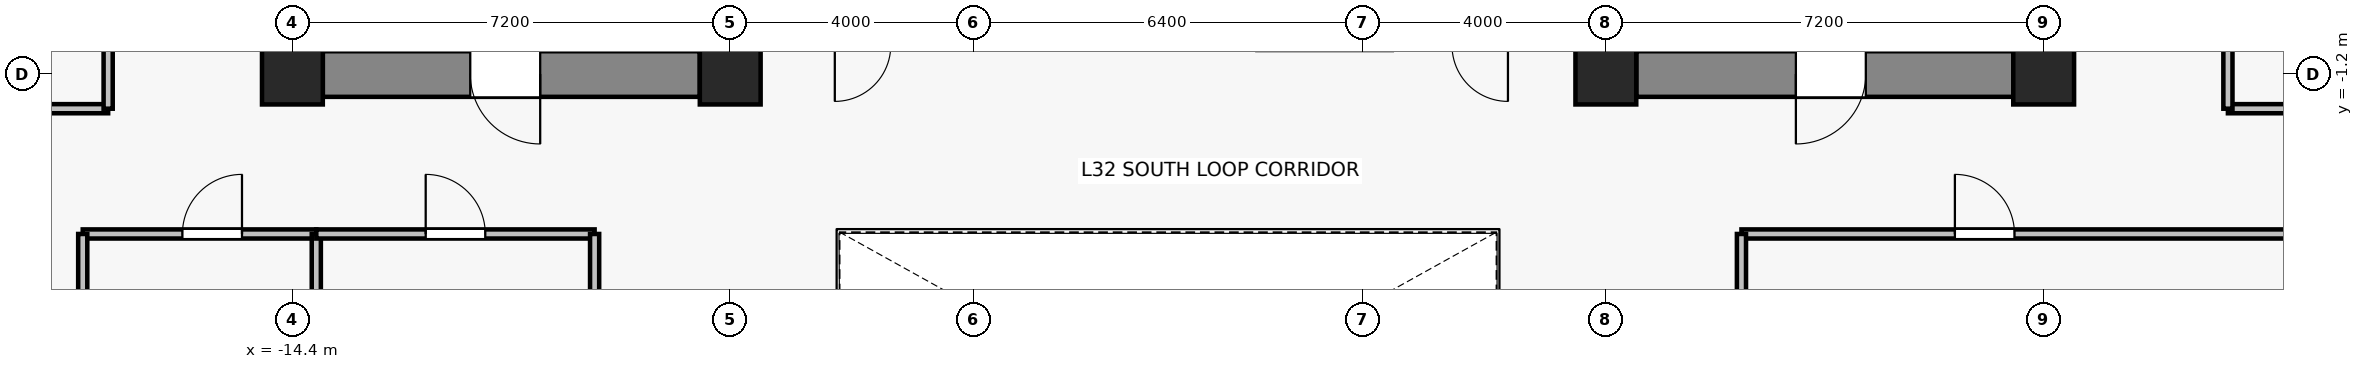
"""IFC4 building model, lengths in metres.
Left out: names, types, materials, properties, quantities, classifications, styles, units other than length and angle.
Written with IfcOpenShell. Run it as: python <this file> out.ifc"""

import sys

from ifc_helpers import new_model, si_unit, direction, frame, frame_2d, origin, origin_2d, place, context, subcontext, project, spatial, rectangle, extrude, source, transform, mapped, element, fill, save


model = new_model("IFC4")
c1 = context("Model", 3, precision=1e-05, world=origin(), true_north=direction((0.0, 1.0)))
c2 = subcontext(c1, "Body", "Model", "MODEL_VIEW")
j1 = project(units=[si_unit("LENGTHUNIT", "METRE"), si_unit("PLANEANGLEUNIT", "RADIAN")], contexts=[c1])
p1 = place(None, origin())
s1 = spatial("IfcSite", under=j1, at=p1, CompositionType="ELEMENT")
p2 = place(p1, origin())
s2 = spatial("IfcBuilding", under=s1, at=p2, CompositionType="ELEMENT")
p3 = place(p2, frame((0.0, 0.0, 116.5)))
s3 = spatial("IfcBuildingStorey", under=s2, at=p3, CompositionType="ELEMENT", Elevation=116.5)
for number, where, z_axis, x_axis in (
    (1, (-14.4, -1.2, 0.0), (0.0, 0.0, 1.0), (1.0, 0.0, 0.0)),
    (2, (-7.2, -1.2, 0.0), (0.0, 0.0, 1.0), (1.0, 0.0, 0.0)),
    (3, (7.2, -1.2, 0.0), (0.0, 0.0, 1.0), (1.0, 0.0, 0.0)),
    (4, (14.4, -1.2, 0.0), (0.0, 0.0, 1.0), (1.0, 0.0, 0.0)),
):
    element("IfcColumn", number, at=place(p3, frame(where, z_axis=z_axis, x_axis=x_axis)), inside=s3, PredefinedType="COLUMN", context=c2, shape_type="SweptSolid", body=[
        extrude(rectangle(XDim=1.0, YDim=1.0, at=origin_2d()), origin(), (0.0, 0.0, 1.0), 3.3),
    ])
p4 = place(p3, frame((-7.7, -1.2, 0.0), z_axis=(0.0, 0.0, 1.0), x_axis=(-1.0, 0.0, 0.0)))
e5 = element("IfcWall", 5, at=p4, inside=s3, PredefinedType="SHEAR", context=c2, shape_type="SweptSolid", body=[
    extrude(rectangle(XDim=6.2, YDim=0.75, at=frame_2d((3.1, 0.0))), origin(), (0.0, 0.0, 1.0), 3.075),
])
p5 = place(p4, frame((2.625, 0.0, 0.0)))
e6 = element("IfcOpeningElement", 6, at=p5, cuts=e5, PredefinedType="OPENING", context=c2, shape_type="SweptSolid", body=[
    extrude(rectangle(XDim=1.15, YDim=2.15, at=frame_2d((0.575, 1.075))), frame((0.0, 0.385, 0.0), z_axis=(0.0, -1.0, 0.0), x_axis=(1.0, 0.0, 0.0)), (0.0, 0.0, 1.0), 0.77),
])
p6 = place(p3, frame((13.9, -1.2, 0.0), z_axis=(0.0, 0.0, 1.0), x_axis=(-1.0, 0.0, 0.0)))
e7 = element("IfcWall", 7, at=p6, inside=s3, PredefinedType="SHEAR", context=c2, shape_type="SweptSolid", body=[
    extrude(rectangle(XDim=6.2, YDim=0.75, at=frame_2d((3.1, 0.0))), origin(), (0.0, 0.0, 1.0), 3.075),
])
p7 = place(p6, frame((2.425, 0.0, 0.0)))
e8 = element("IfcOpeningElement", 8, at=p7, cuts=e7, PredefinedType="OPENING", context=c2, shape_type="SweptSolid", body=[
    extrude(rectangle(XDim=1.15, YDim=2.15, at=frame_2d((0.575, 1.075))), frame((0.0, 0.385, 0.0), z_axis=(0.0, -1.0, 0.0), x_axis=(1.0, 0.0, 0.0)), (0.0, 0.0, 1.0), 0.77),
])
p8 = place(p3, frame((-17.848, -3.83, 0.0), z_axis=(0.0, 0.0, 1.0), x_axis=(1.0, 0.0, 0.0)))
e9 = element("IfcWall", 9, at=p8, inside=s3, PredefinedType="PARTITIONING", context=c2, shape_type="SweptSolid", body=[
    extrude(rectangle(XDim=3.841, YDim=0.15, at=frame_2d((1.92, 0.0))), origin(), (0.0, 0.0, 1.0), 2.515),
])
p9 = place(p8, frame((1.639, 0.0, 0.0)))
e10 = element("IfcOpeningElement", 10, at=p9, cuts=e9, PredefinedType="OPENING", context=c2, shape_type="SweptSolid", body=[
    extrude(rectangle(XDim=0.98, YDim=2.15, at=frame_2d((0.49, 1.075))), frame((0.0, 0.085, 0.0), z_axis=(0.0, -1.0, 0.0), x_axis=(1.0, 0.0, 0.0)), (0.0, 0.0, 1.0), 0.17),
])
p10 = place(p3, frame((-17.848, -12.52, 0.0), z_axis=(0.0, 0.0, 1.0), x_axis=(0.0, 1.0, 0.0)))
e11 = element("IfcWall", 11, at=p10, inside=s3, PredefinedType="PARTITIONING", context=c2, shape_type="SweptSolid", body=[
    extrude(rectangle(XDim=8.69, YDim=0.15, at=frame_2d((4.345, 0.0))), origin(), (0.0, 0.0, 1.0), 2.515),
])
p11 = place(p3, frame((-14.007, -3.83, 0.0), z_axis=(0.0, 0.0, 1.0), x_axis=(0.0, -1.0, 0.0)))
e12 = element("IfcWall", 12, at=p11, inside=s3, PredefinedType="PARTITIONING", context=c2, shape_type="SweptSolid", body=[
    extrude(rectangle(XDim=5.3, YDim=0.15, at=frame_2d((2.65, 0.0))), origin(), (0.0, 0.0, 1.0), 2.615),
])
p12 = place(p3, frame((-14.007, -3.83, 0.0), z_axis=(0.0, 0.0, 1.0), x_axis=(1.0, 0.0, 0.0)))
e13 = element("IfcWall", 13, at=p12, inside=s3, PredefinedType="PARTITIONING", context=c2, shape_type="SweptSolid", body=[
    extrude(rectangle(XDim=4.577, YDim=0.15, at=frame_2d((2.289, 0.0))), origin(), (0.0, 0.0, 1.0), 3.075),
])
p13 = place(p12, frame((1.799, 0.0, 0.0)))
e14 = element("IfcOpeningElement", 14, at=p13, cuts=e13, PredefinedType="OPENING", context=c2, shape_type="SweptSolid", body=[
    extrude(rectangle(XDim=0.98, YDim=2.15, at=frame_2d((0.49, 1.075))), frame((0.0, 0.085, 0.0), z_axis=(0.0, -1.0, 0.0), x_axis=(1.0, 0.0, 0.0)), (0.0, 0.0, 1.0), 0.17),
])
p14 = place(p3, frame((-9.43, -3.83, 0.0), z_axis=(0.0, 0.0, 1.0), x_axis=(0.0, -1.0, 0.0)))
e15 = element("IfcWall", 15, at=p14, inside=s3, PredefinedType="PARTITIONING", context=c2, shape_type="SweptSolid", body=[
    extrude(rectangle(XDim=8.69, YDim=0.15, at=frame_2d((4.345, 0.0))), origin(), (0.0, 0.0, 1.0), 2.515),
])
p15 = place(p3, frame((9.43, -3.83, 0.0), z_axis=(0.0, 0.0, 1.0), x_axis=(1.0, 0.0, 0.0)))
e16 = element("IfcWall", 16, at=p15, inside=s3, PredefinedType="PARTITIONING", context=c2, shape_type="SweptSolid", body=[
    extrude(rectangle(XDim=20.1, YDim=0.15, at=frame_2d((10.05, 0.0))), origin(), (0.0, 0.0, 1.0), 2.515),
])
p16 = place(p15, frame((3.51, 0.0, 0.0)))
e17 = element("IfcOpeningElement", 17, at=p16, cuts=e16, PredefinedType="OPENING", context=c2, shape_type="SweptSolid", body=[
    extrude(rectangle(XDim=0.98, YDim=2.15, at=frame_2d((0.49, 1.075))), frame((0.0, 0.085, 0.0), z_axis=(0.0, -1.0, 0.0), x_axis=(1.0, 0.0, 0.0)), (0.0, 0.0, 1.0), 0.17),
])
p17 = place(p3, frame((9.43, -12.52, 0.0), z_axis=(0.0, 0.0, 1.0), x_axis=(0.0, 1.0, 0.0)))
e18 = element("IfcWall", 18, at=p17, inside=s3, PredefinedType="PARTITIONING", context=c2, shape_type="SweptSolid", body=[
    extrude(rectangle(XDim=8.69, YDim=0.15, at=frame_2d((4.345, 0.0))), origin(), (0.0, 0.0, 1.0), 2.515),
])
p18 = place(p3, frame((-17.43, -1.77, 0.0), z_axis=(0.0, 0.0, 1.0), x_axis=(-1.0, 0.0, 0.0)))
e19 = element("IfcWall", 19, at=p18, inside=s3, PredefinedType="PARTITIONING", context=c2, shape_type="SweptSolid", body=[
    extrude(rectangle(XDim=8.1, YDim=0.15, at=frame_2d((4.05, 0.0))), origin(), (0.0, 0.0, 1.0), 2.515),
])
p19 = place(p3, frame((-17.43, 1.964, 0.0), z_axis=(0.0, 0.0, 1.0), x_axis=(0.0, -1.0, 0.0)))
e20 = element("IfcWall", 20, at=p19, inside=s3, PredefinedType="PARTITIONING", context=c2, shape_type="SweptSolid", body=[
    extrude(rectangle(XDim=3.734, YDim=0.15, at=frame_2d((1.867, 0.0))), origin(), (0.0, 0.0, 1.0), 2.515),
])
p20 = place(p19, frame((1.377, 0.0, 0.0)))
e21 = element("IfcOpeningElement", 21, at=p20, cuts=e20, PredefinedType="OPENING", context=c2, shape_type="SweptSolid", body=[
    extrude(rectangle(XDim=0.98, YDim=2.15, at=frame_2d((0.49, 1.075))), frame((0.0, 0.085, 0.0), z_axis=(0.0, -1.0, 0.0), x_axis=(1.0, 0.0, 0.0)), (0.0, 0.0, 1.0), 0.17),
])
p21 = place(p3, frame((29.53, -1.77, 0.0), z_axis=(0.0, 0.0, 1.0), x_axis=(-1.0, 0.0, 0.0)))
e22 = element("IfcWall", 22, at=p21, inside=s3, PredefinedType="PARTITIONING", context=c2, shape_type="SweptSolid", body=[
    extrude(rectangle(XDim=12.1, YDim=0.15, at=frame_2d((6.05, 0.0))), origin(), (0.0, 0.0, 1.0), 2.515),
])
p22 = place(p3, frame((17.43, -1.77, 0.0), z_axis=(0.0, 0.0, 1.0), x_axis=(0.0, 1.0, 0.0)))
e23 = element("IfcWall", 23, at=p22, inside=s3, PredefinedType="PARTITIONING", context=c2, shape_type="SweptSolid", body=[
    extrude(rectangle(XDim=6.292, YDim=0.15, at=frame_2d((3.146, 0.0))), origin(), (0.0, 0.0, 1.0), 2.515),
])
p23 = place(p22, frame((2.656, 0.0, 0.0)))
e24 = element("IfcOpeningElement", 24, at=p23, cuts=e23, PredefinedType="OPENING", context=c2, shape_type="SweptSolid", body=[
    extrude(rectangle(XDim=0.98, YDim=2.15, at=frame_2d((0.49, 1.075))), frame((0.0, 0.085, 0.0), z_axis=(0.0, -1.0, 0.0), x_axis=(1.0, 0.0, 0.0)), (0.0, 0.0, 1.0), 0.17),
])
m1 = source(origin(), c2, "Body", "SweptSolid", [
    extrude(rectangle(XDim=1.15, YDim=2.15, at=frame_2d((0.575, 1.075))), frame((0.0, 0.025, 0.0), z_axis=(0.0, -1.0, 0.0), x_axis=(1.0, 0.0, 0.0)), (0.0, 0.0, 1.0), 0.05),
])
p24 = place(p5, origin())
e25 = element("IfcDoor", 25, at=p24, inside=s3, OperationType="SINGLE_SWING_LEFT", PredefinedType="DOOR", context=c2, shape_type="MappedRepresentation", body=[
    mapped(m1, transform((0.0, 0.0, 0.0), x_axis=(1.0, 0.0, 0.0), y_axis=(0.0, 1.0, 0.0), z_axis=(0.0, 0.0, 1.0), scale=1.0)),
])
fill(e6, e25)
p25 = place(p7, origin())
e26 = element("IfcDoor", 26, at=p25, inside=s3, OperationType="SINGLE_SWING_RIGHT", PredefinedType="DOOR", context=c2, shape_type="MappedRepresentation", body=[
    mapped(m1, transform((0.0, 0.0, 0.0), x_axis=(1.0, 0.0, 0.0), y_axis=(0.0, 1.0, 0.0), z_axis=(0.0, 0.0, 1.0), scale=1.0)),
])
fill(e8, e26)
m2 = source(origin(), c2, "Body", "SweptSolid", [
    extrude(rectangle(XDim=0.98, YDim=2.15, at=frame_2d((0.49, 1.075))), frame((0.0, 0.025, 0.0), z_axis=(0.0, -1.0, 0.0), x_axis=(1.0, 0.0, 0.0)), (0.0, 0.0, 1.0), 0.05),
])
p26 = place(p9, origin())
e27 = element("IfcDoor", 27, at=p26, inside=s3, OperationType="SINGLE_SWING_RIGHT", PredefinedType="DOOR", context=c2, shape_type="MappedRepresentation", body=[
    mapped(m2, transform((0.0, 0.0, 0.0), x_axis=(1.0, 0.0, 0.0), y_axis=(0.0, 1.0, 0.0), z_axis=(0.0, 0.0, 1.0), scale=1.0)),
])
fill(e10, e27)
p27 = place(p13, origin())
e28 = element("IfcDoor", 28, at=p27, inside=s3, OperationType="SINGLE_SWING_LEFT", PredefinedType="DOOR", context=c2, shape_type="MappedRepresentation", body=[
    mapped(m2, transform((0.0, 0.0, 0.0), x_axis=(1.0, 0.0, 0.0), y_axis=(0.0, 1.0, 0.0), z_axis=(0.0, 0.0, 1.0), scale=1.0)),
])
fill(e14, e28)
p28 = place(p16, origin())
e29 = element("IfcDoor", 29, at=p28, inside=s3, OperationType="SINGLE_SWING_LEFT", PredefinedType="DOOR", context=c2, shape_type="MappedRepresentation", body=[
    mapped(m2, transform((0.0, 0.0, 0.0), x_axis=(1.0, 0.0, 0.0), y_axis=(0.0, 1.0, 0.0), z_axis=(0.0, 0.0, 1.0), scale=1.0)),
])
fill(e17, e29)
save(model, sys.argv[1])
